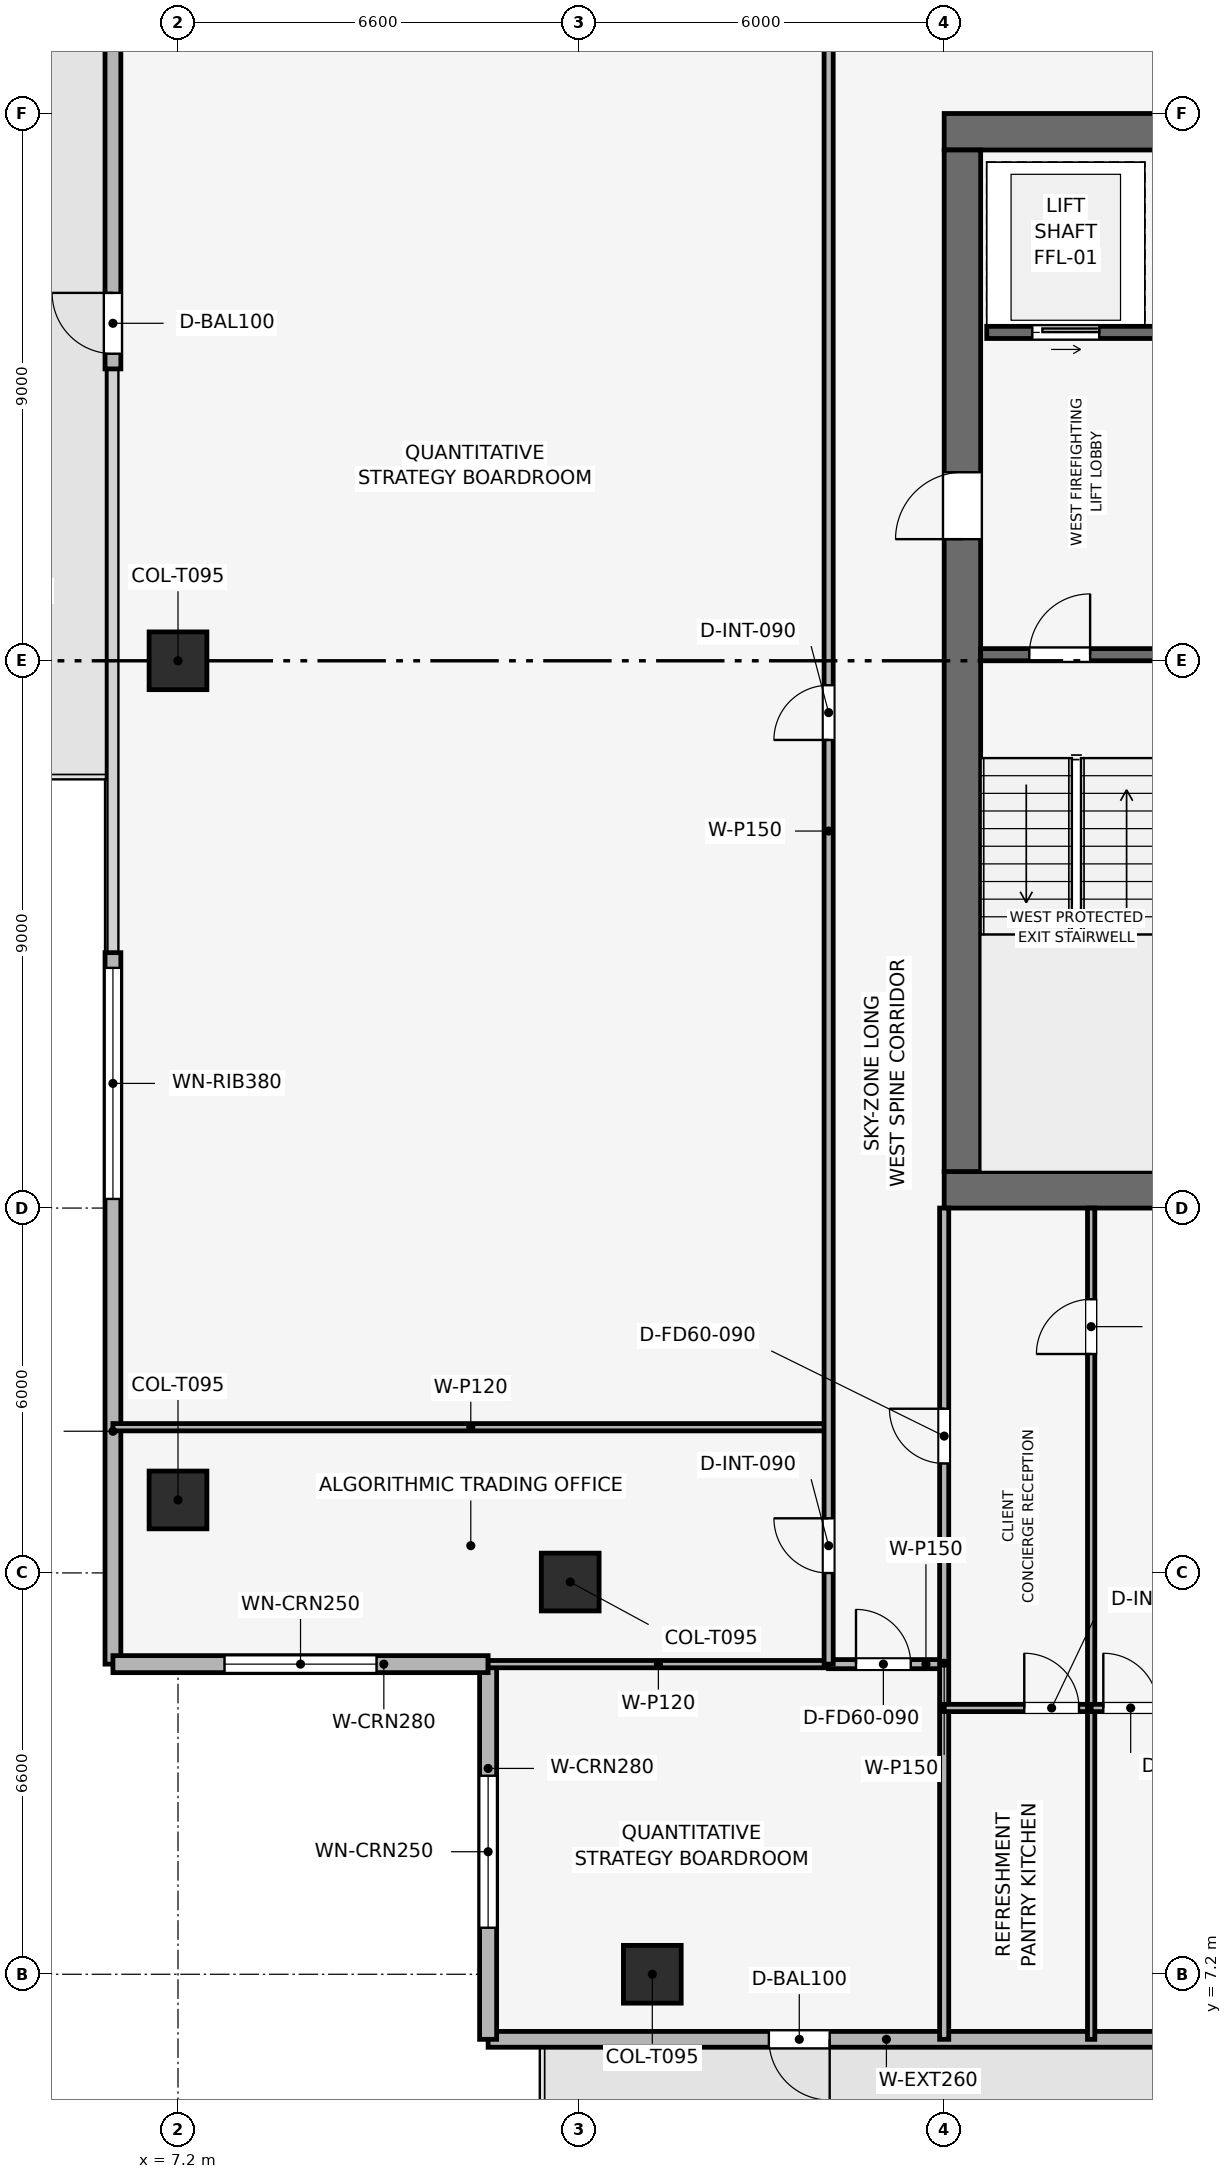
"""IFC4 building model, lengths in metres.
Left out: names, types, materials, properties, quantities, classifications, styles, units other than length and angle.
Written with IfcOpenShell. Run it as: python <this file> out.ifc"""

import sys

from ifc_helpers import new_model, si_unit, direction, frame, frame_2d, origin, origin_2d, place, context, subcontext, project, spatial, rectangle, extrude, element, fill, save


model = new_model("IFC4")
c1 = context("Model", 3, precision=1e-05, world=origin(), true_north=direction((0.0, 1.0)))
c2 = subcontext(c1, "Body", "Model", "MODEL_VIEW")
j1 = project(units=[si_unit("LENGTHUNIT", "METRE"), si_unit("PLANEANGLEUNIT", "RADIAN")], contexts=[c1])
p1 = place(None, origin())
s1 = spatial("IfcSite", under=j1, at=p1, CompositionType="ELEMENT")
p2 = place(p1, origin())
s2 = spatial("IfcBuilding", under=s1, at=p2, CompositionType="ELEMENT")
p3 = place(p2, frame((0.0, 0.0, 325.5)))
s3 = spatial("IfcBuildingStorey", under=s2, at=p3, CompositionType="ELEMENT", Elevation=325.5)
p4 = place(p3, frame((19.8, 20.1, 0.0), z_axis=(0.0, 0.0, 1.0), x_axis=(1.0, 0.0, 0.0)))
e1 = element("IfcWall", 1, at=p4, inside=s3, PredefinedType="SHEAR", context=c2, shape_type="SweptSolid", body=[
    extrude(rectangle(XDim=18.0, YDim=0.6, at=frame_2d((9.0, 0.0))), origin(), (0.0, 0.0, 1.0), 3.75),
])
p5 = place(p3, frame((19.8, 37.5, 0.0), z_axis=(0.0, 0.0, 1.0), x_axis=(1.0, 0.0, 0.0)))
e2 = element("IfcWall", 2, at=p5, inside=s3, PredefinedType="SHEAR", context=c2, shape_type="SweptSolid", body=[
    extrude(rectangle(XDim=18.0, YDim=0.6, at=frame_2d((9.0, 0.0))), origin(), (0.0, 0.0, 1.0), 3.75),
])
p6 = place(p5, frame((7.05, 0.0, 0.0)))
e3 = element("IfcOpeningElement", 3, at=p6, cuts=e2, PredefinedType="OPENING", context=c2, shape_type="SweptSolid", body=[
    extrude(rectangle(XDim=1.1, YDim=2.15, at=frame_2d((0.55, 1.075))), frame((0.0, 0.31, 0.0), z_axis=(0.0, -1.0, 0.0), x_axis=(1.0, 0.0, 0.0)), (0.0, 0.0, 1.0), 0.62),
])
p7 = place(p3, frame((20.1, 20.4, 0.0), z_axis=(0.0, 0.0, 1.0), x_axis=(0.0, 1.0, 0.0)))
e4 = element("IfcWall", 4, at=p7, inside=s3, PredefinedType="SHEAR", context=c2, shape_type="SweptSolid", body=[
    extrude(rectangle(XDim=16.8, YDim=0.6, at=frame_2d((8.4, 0.0))), origin(), (0.0, 0.0, 1.0), 3.75),
])
p8 = place(p7, frame((10.4, 0.0, 0.0)))
e5 = element("IfcOpeningElement", 5, at=p8, cuts=e4, PredefinedType="OPENING", context=c2, shape_type="SweptSolid", body=[
    extrude(rectangle(XDim=1.1, YDim=2.15, at=frame_2d((0.55, 1.075))), frame((0.0, 0.31, 0.0), z_axis=(0.0, -1.0, 0.0), x_axis=(1.0, 0.0, 0.0)), (0.0, 0.0, 1.0), 0.62),
])
for number, where, z_axis, x_axis in (
    (6, (15.0, 7.2, 0.003), (0.0, 0.0, 1.0), (1.0, 0.0, 0.0)),
    (7, (7.2, 28.8, 0.003), (0.0, 0.0, 1.0), (1.0, 0.0, 0.0)),
    (8, (7.2, 15.0, 0.003), (0.0, 0.0, 1.0), (1.0, 0.0, 0.0)),
    (9, (13.65, 13.65, 0.003), (0.0, 0.0, 1.0), (1.0, 0.0, 0.0)),
):
    element("IfcColumn", number, at=place(p3, frame(where, z_axis=z_axis, x_axis=x_axis)), inside=s3, PredefinedType="COLUMN", context=c2, shape_type="SweptSolid", body=[
        extrude(rectangle(XDim=0.95, YDim=0.95, at=origin_2d()), origin(), (0.0, 0.0, 1.0), 3.504),
    ])
p9 = place(p3, frame((24.0, 6.13, 0.0), z_axis=(0.0, 0.0, 1.0), x_axis=(-1.0, 0.0, 0.0)))
e10 = element("IfcWall", 10, at=p9, inside=s3, PredefinedType="SOLIDWALL", context=c2, shape_type="SweptSolid", body=[
    extrude(rectangle(XDim=11.7, YDim=0.26, at=frame_2d((5.85, 0.0))), origin(), (0.0, 0.0, 1.0), 3.51),
])
p10 = place(p9, frame((6.083, 0.0, 0.0)))
e11 = element("IfcOpeningElement", 11, at=p10, cuts=e10, PredefinedType="OPENING", context=c2, shape_type="SweptSolid", body=[
    extrude(rectangle(XDim=1.0, YDim=2.2, at=frame_2d((0.5, 1.1))), frame((0.0, 0.14, 0.0), z_axis=(0.0, -1.0, 0.0), x_axis=(1.0, 0.0, 0.0)), (0.0, 0.0, 1.0), 0.28),
])
p11 = place(p3, frame((6.13, 12.3, 0.0), z_axis=(0.0, 0.0, 1.0), x_axis=(0.0, 1.0, 0.0)))
e12 = element("IfcWall", 12, at=p11, inside=s3, PredefinedType="SOLIDWALL", context=c2, shape_type="SweptSolid", body=[
    extrude(rectangle(XDim=11.7, YDim=0.26, at=frame_2d((5.85, 0.0))), origin(), (0.0, 0.0, 1.0), 3.51),
])
p12 = place(p11, frame((7.65, 0.0, 0.9)))
e13 = element("IfcOpeningElement", 13, at=p12, cuts=e12, PredefinedType="OPENING", context=c2, shape_type="SweptSolid", body=[
    extrude(rectangle(XDim=3.8, YDim=1.9, at=frame_2d((1.9, 0.95))), frame((0.0, 0.14, 0.0), z_axis=(0.0, -1.0, 0.0), x_axis=(1.0, 0.0, 0.0)), (0.0, 0.0, 1.0), 0.28),
])
p13 = place(p3, frame((6.13, 33.6, 0.0), z_axis=(0.0, 0.0, 1.0), x_axis=(0.0, 1.0, 0.0)))
e14 = element("IfcWall", 14, at=p13, inside=s3, PredefinedType="SOLIDWALL", context=c2, shape_type="SweptSolid", body=[
    extrude(rectangle(XDim=11.7, YDim=0.26, at=frame_2d((5.85, 0.0))), origin(), (0.0, 0.0, 1.0), 3.51),
])
p14 = place(p13, frame((0.25, 0.0, 0.0)))
e15 = element("IfcOpeningElement", 15, at=p14, cuts=e14, PredefinedType="OPENING", context=c2, shape_type="SweptSolid", body=[
    extrude(rectangle(XDim=1.0, YDim=2.2, at=frame_2d((0.5, 1.1))), frame((0.0, 0.14, 0.0), z_axis=(0.0, -1.0, 0.0), x_axis=(1.0, 0.0, 0.0)), (0.0, 0.0, 1.0), 0.28),
])
p15 = place(p3, frame((12.3, 6.13, 0.0), z_axis=(0.0, 0.0, 1.0), x_axis=(0.0, 1.0, 0.0)))
e16 = element("IfcWall", 16, at=p15, inside=s3, PredefinedType="SOLIDWALL", context=c2, shape_type="SweptSolid", body=[
    extrude(rectangle(XDim=6.17, YDim=0.28, at=frame_2d((3.085, 0.0))), origin(), (0.0, 0.0, 1.0), 3.51),
])
p16 = place(p15, frame((1.835, 0.0, 0.9)))
e17 = element("IfcOpeningElement", 17, at=p16, cuts=e16, PredefinedType="OPENING", context=c2, shape_type="SweptSolid", body=[
    extrude(rectangle(XDim=2.5, YDim=1.9, at=frame_2d((1.25, 0.95))), frame((0.0, 0.15, 0.0), z_axis=(0.0, -1.0, 0.0), x_axis=(1.0, 0.0, 0.0)), (0.0, 0.0, 1.0), 0.3),
])
p17 = place(p3, frame((12.3, 12.3, 0.0), z_axis=(0.0, 0.0, 1.0), x_axis=(-1.0, 0.0, 0.0)))
e18 = element("IfcWall", 18, at=p17, inside=s3, PredefinedType="SOLIDWALL", context=c2, shape_type="SweptSolid", body=[
    extrude(rectangle(XDim=6.17, YDim=0.28, at=frame_2d((3.085, 0.0))), origin(), (0.0, 0.0, 1.0), 3.51),
])
p18 = place(p17, frame((1.835, 0.0, 0.9)))
e19 = element("IfcOpeningElement", 19, at=p18, cuts=e18, PredefinedType="OPENING", context=c2, shape_type="SweptSolid", body=[
    extrude(rectangle(XDim=2.5, YDim=1.9, at=frame_2d((1.25, 0.95))), frame((0.0, 0.15, 0.0), z_axis=(0.0, -1.0, 0.0), x_axis=(1.0, 0.0, 0.0)), (0.0, 0.0, 1.0), 0.3),
])
p19 = place(p3, frame((20.4, 28.9, 0.0), z_axis=(0.0, 0.0, 1.0), x_axis=(1.0, 0.0, 0.0)))
e20 = element("IfcWall", 20, at=p19, inside=s3, PredefinedType="SHEAR", context=c2, shape_type="SweptSolid", body=[
    extrude(rectangle(XDim=3.15, YDim=0.2, at=frame_2d((1.575, 0.0))), origin(), (0.0, 0.0, 1.0), 3.51),
])
p20 = place(p19, frame((0.8, 0.0, 0.0)))
e21 = element("IfcOpeningElement", 21, at=p20, cuts=e20, PredefinedType="OPENING", context=c2, shape_type="SweptSolid", body=[
    extrude(rectangle(XDim=1.0, YDim=2.1, at=frame_2d((0.5, 1.05))), frame((0.0, 0.11, 0.0), z_axis=(0.0, -1.0, 0.0), x_axis=(1.0, 0.0, 0.0)), (0.0, 0.0, 1.0), 0.22),
])
p21 = place(p3, frame((20.5, 34.2, 0.0), z_axis=(0.0, 0.0, 1.0), x_axis=(1.0, 0.0, 0.0)))
e22 = element("IfcWall", 22, at=p21, inside=s3, PredefinedType="SHEAR", context=c2, shape_type="SweptSolid", body=[
    extrude(rectangle(XDim=3.05, YDim=0.2, at=frame_2d((1.525, 0.0))), origin(), (0.0, 0.0, 1.0), 3.51),
])
p22 = place(p21, frame((0.75, 0.0, 0.0)))
e23 = element("IfcOpeningElement", 23, at=p22, cuts=e22, PredefinedType="OPENING", context=c2, shape_type="SweptSolid", body=[
    extrude(rectangle(XDim=1.1, YDim=2.15, at=frame_2d((0.55, 1.075))), frame((0.0, 0.11, 0.0), z_axis=(0.0, -1.0, 0.0), x_axis=(1.0, 0.0, 0.0)), (0.0, 0.0, 1.0), 0.22),
])
p23 = place(p3, frame((6.13, 16.196, 0.0), z_axis=(0.0, 0.0, 1.0), x_axis=(1.0, 0.0, 0.0)))
e24 = element("IfcWall", 24, at=p23, inside=s3, PredefinedType="PARTITIONING", context=c2, shape_type="SweptSolid", body=[
    extrude(rectangle(XDim=11.77, YDim=0.12, at=frame_2d((5.885, 0.0))), origin(), (0.0, 0.0, 1.0), 3.095),
])
p24 = place(p3, frame((12.3, 12.3, 0.0), z_axis=(0.0, 0.0, 1.0), x_axis=(1.0, 0.0, 0.0)))
e25 = element("IfcWall", 25, at=p24, inside=s3, PredefinedType="PARTITIONING", context=c2, shape_type="SweptSolid", body=[
    extrude(rectangle(XDim=5.6, YDim=0.12, at=frame_2d((2.8, 0.0))), origin(), (0.0, 0.0, 1.0), 3.195),
])
p25 = place(p3, frame((17.9, 12.3, 0.0), z_axis=(0.0, 0.0, 1.0), x_axis=(1.0, 0.0, 0.0)))
e26 = element("IfcWall", 26, at=p25, inside=s3, PredefinedType="PARTITIONING", context=c2, shape_type="SweptSolid", body=[
    extrude(rectangle(XDim=1.9, YDim=0.15, at=frame_2d((0.95, 0.0))), origin(), (0.0, 0.0, 1.0), 3.51),
])
p26 = place(p25, frame((0.45, 0.0, 0.0)))
e27 = element("IfcOpeningElement", 27, at=p26, cuts=e26, PredefinedType="OPENING", context=c2, shape_type="SweptSolid", body=[
    extrude(rectangle(XDim=0.9, YDim=2.1, at=frame_2d((0.45, 1.05))), frame((0.0, 0.085, 0.0), z_axis=(0.0, -1.0, 0.0), x_axis=(1.0, 0.0, 0.0)), (0.0, 0.0, 1.0), 0.17),
])
p27 = place(p3, frame((19.8, 6.13, 0.0), z_axis=(0.0, 0.0, 1.0), x_axis=(0.0, 1.0, 0.0)))
e28 = element("IfcWall", 28, at=p27, inside=s3, PredefinedType="PARTITIONING", context=c2, shape_type="SweptSolid", body=[
    extrude(rectangle(XDim=13.67, YDim=0.15, at=frame_2d((6.835, 0.0))), origin(), (0.0, 0.0, 1.0), 3.095),
])
p28 = place(p27, frame((9.47, 0.0, 0.0)))
e29 = element("IfcOpeningElement", 29, at=p28, cuts=e28, PredefinedType="OPENING", context=c2, shape_type="SweptSolid", body=[
    extrude(rectangle(XDim=0.9, YDim=2.1, at=frame_2d((0.45, 1.05))), frame((0.0, 0.085, 0.0), z_axis=(0.0, -1.0, 0.0), x_axis=(1.0, 0.0, 0.0)), (0.0, 0.0, 1.0), 0.17),
])
p29 = place(p3, frame((19.8, 11.579, 0.0), z_axis=(0.0, 0.0, 1.0), x_axis=(1.0, 0.0, 0.0)))
e30 = element("IfcWall", 30, at=p29, inside=s3, PredefinedType="PARTITIONING", context=c2, shape_type="SweptSolid", body=[
    extrude(rectangle(XDim=2.417, YDim=0.12, at=frame_2d((1.208, 0.0))), origin(), (0.0, 0.0, 1.0), 3.095),
])
p30 = place(p29, frame((1.317, 0.0, 0.0)))
e31 = element("IfcOpeningElement", 31, at=p30, cuts=e30, PredefinedType="OPENING", context=c2, shape_type="SweptSolid", body=[
    extrude(rectangle(XDim=0.9, YDim=2.1, at=frame_2d((0.45, 1.05))), frame((0.0, 0.07, 0.0), z_axis=(0.0, -1.0, 0.0), x_axis=(1.0, 0.0, 0.0)), (0.0, 0.0, 1.0), 0.14),
])
p31 = place(p3, frame((22.217, 6.13, 0.0), z_axis=(0.0, 0.0, 1.0), x_axis=(0.0, 1.0, 0.0)))
e32 = element("IfcWall", 32, at=p31, inside=s3, PredefinedType="PARTITIONING", context=c2, shape_type="SweptSolid", body=[
    extrude(rectangle(XDim=13.67, YDim=0.12, at=frame_2d((6.835, 0.0))), origin(), (0.0, 0.0, 1.0), 3.135),
])
p32 = place(p31, frame((11.27, 0.0, 0.0)))
e33 = element("IfcOpeningElement", 33, at=p32, cuts=e32, PredefinedType="OPENING", context=c2, shape_type="SweptSolid", body=[
    extrude(rectangle(XDim=0.9, YDim=2.1, at=frame_2d((0.45, 1.05))), frame((0.0, 0.07, 0.0), z_axis=(0.0, -1.0, 0.0), x_axis=(1.0, 0.0, 0.0)), (0.0, 0.0, 1.0), 0.14),
])
p33 = place(p3, frame((22.217, 11.579, 0.0), z_axis=(0.0, 0.0, 1.0), x_axis=(1.0, 0.0, 0.0)))
e34 = element("IfcWall", 34, at=p33, inside=s3, PredefinedType="PARTITIONING", context=c2, shape_type="SweptSolid", body=[
    extrude(rectangle(XDim=10.281, YDim=0.12, at=frame_2d((5.141, 0.0))), origin(), (0.0, 0.0, 1.0), 3.095),
])
p34 = place(p33, frame((0.2, 0.0, 0.0)))
e35 = element("IfcOpeningElement", 35, at=p34, cuts=e34, PredefinedType="OPENING", context=c2, shape_type="SweptSolid", body=[
    extrude(rectangle(XDim=0.9, YDim=2.1, at=frame_2d((0.45, 1.05))), frame((0.0, 0.07, 0.0), z_axis=(0.0, -1.0, 0.0), x_axis=(1.0, 0.0, 0.0)), (0.0, 0.0, 1.0), 0.14),
])
p35 = place(p3, frame((17.9, 12.3, 0.0), z_axis=(0.0, 0.0, 1.0), x_axis=(0.0, 1.0, 0.0)))
e36 = element("IfcWall", 36, at=p35, inside=s3, PredefinedType="PARTITIONING", context=c2, shape_type="SweptSolid", body=[
    extrude(rectangle(XDim=27.4, YDim=0.15, at=frame_2d((13.7, 0.0))), origin(), (0.0, 0.0, 1.0), 3.095),
])
p36 = place(p35, frame((1.498, 0.0, 0.0)))
e37 = element("IfcOpeningElement", 37, at=p36, cuts=e36, PredefinedType="OPENING", context=c2, shape_type="SweptSolid", body=[
    extrude(rectangle(XDim=0.9, YDim=2.1, at=frame_2d((0.45, 1.05))), frame((0.0, 0.085, 0.0), z_axis=(0.0, -1.0, 0.0), x_axis=(1.0, 0.0, 0.0)), (0.0, 0.0, 1.0), 0.17),
])
p37 = place(p35, frame((15.198, 0.0, 0.0)))
e38 = element("IfcOpeningElement", 38, at=p37, cuts=e36, PredefinedType="OPENING", context=c2, shape_type="SweptSolid", body=[
    extrude(rectangle(XDim=0.9, YDim=2.1, at=frame_2d((0.45, 1.05))), frame((0.0, 0.085, 0.0), z_axis=(0.0, -1.0, 0.0), x_axis=(1.0, 0.0, 0.0)), (0.0, 0.0, 1.0), 0.17),
])
p38 = place(p10, origin())
e39 = element("IfcDoor", 39, at=p38, inside=s3, OperationType="SINGLE_SWING_LEFT", PredefinedType="DOOR", context=c2, shape_type="SweptSolid", body=[
    extrude(rectangle(XDim=1.0, YDim=2.2, at=frame_2d((0.5, 1.1))), frame((0.0, 0.025, 0.0), z_axis=(0.0, -1.0, 0.0), x_axis=(1.0, 0.0, 0.0)), (0.0, 0.0, 1.0), 0.05),
])
fill(e11, e39)
p39 = place(p14, origin())
e40 = element("IfcDoor", 40, at=p39, inside=s3, OperationType="SINGLE_SWING_RIGHT", PredefinedType="DOOR", context=c2, shape_type="SweptSolid", body=[
    extrude(rectangle(XDim=1.0, YDim=2.2, at=frame_2d((0.5, 1.1))), frame((0.0, 0.025, 0.0), z_axis=(0.0, -1.0, 0.0), x_axis=(1.0, 0.0, 0.0)), (0.0, 0.0, 1.0), 0.05),
])
fill(e15, e40)
p40 = place(p12, origin())
e41 = element("IfcWindow", 41, at=p40, inside=s3, PartitioningType="SINGLE_PANEL", PredefinedType="WINDOW", context=c2, shape_type="SweptSolid", body=[
    extrude(rectangle(XDim=3.8, YDim=1.9, at=frame_2d((1.9, 0.95))), frame((0.0, 0.03, 0.0), z_axis=(0.0, -1.0, 0.0), x_axis=(1.0, 0.0, 0.0)), (0.0, 0.0, 1.0), 0.06),
])
fill(e13, e41)
p41 = place(p16, origin())
e42 = element("IfcWindow", 42, at=p41, inside=s3, PartitioningType="SINGLE_PANEL", PredefinedType="WINDOW", context=c2, shape_type="SweptSolid", body=[
    extrude(rectangle(XDim=2.5, YDim=1.9, at=frame_2d((1.25, 0.95))), frame((0.0, 0.03, 0.0), z_axis=(0.0, -1.0, 0.0), x_axis=(1.0, 0.0, 0.0)), (0.0, 0.0, 1.0), 0.06),
])
fill(e17, e42)
p42 = place(p18, origin())
e43 = element("IfcWindow", 43, at=p42, inside=s3, PartitioningType="SINGLE_PANEL", PredefinedType="WINDOW", context=c2, shape_type="SweptSolid", body=[
    extrude(rectangle(XDim=2.5, YDim=1.9, at=frame_2d((1.25, 0.95))), frame((0.0, 0.03, 0.0), z_axis=(0.0, -1.0, 0.0), x_axis=(1.0, 0.0, 0.0)), (0.0, 0.0, 1.0), 0.06),
])
fill(e19, e43)
p43 = place(p20, origin())
e44 = element("IfcDoor", 44, at=p43, inside=s3, OperationType="SINGLE_SWING_RIGHT", PredefinedType="DOOR", context=c2, shape_type="SweptSolid", body=[
    extrude(rectangle(XDim=1.0, YDim=2.1, at=frame_2d((0.5, 1.05))), frame((0.0, 0.025, 0.0), z_axis=(0.0, -1.0, 0.0), x_axis=(1.0, 0.0, 0.0)), (0.0, 0.0, 1.0), 0.05),
])
fill(e21, e44)
p44 = place(p22, origin())
e45 = element("IfcDoor", 45, at=p44, inside=s3, OperationType="SLIDING_TO_RIGHT", PredefinedType="DOOR", context=c2, shape_type="SweptSolid", body=[
    extrude(rectangle(XDim=1.1, YDim=2.15, at=frame_2d((0.55, 1.075))), frame((0.0, 0.025, 0.0), z_axis=(0.0, -1.0, 0.0), x_axis=(1.0, 0.0, 0.0)), (0.0, 0.0, 1.0), 0.05),
])
fill(e23, e45)
p45 = place(p26, origin())
e46 = element("IfcDoor", 46, at=p45, inside=s3, OperationType="SINGLE_SWING_LEFT", PredefinedType="DOOR", context=c2, shape_type="SweptSolid", body=[
    extrude(rectangle(XDim=0.9, YDim=2.1, at=frame_2d((0.45, 1.05))), frame((0.0, 0.025, 0.0), z_axis=(0.0, -1.0, 0.0), x_axis=(1.0, 0.0, 0.0)), (0.0, 0.0, 1.0), 0.05),
])
fill(e27, e46)
p46 = place(p28, origin())
e47 = element("IfcDoor", 47, at=p46, inside=s3, OperationType="SINGLE_SWING_RIGHT", PredefinedType="DOOR", context=c2, shape_type="SweptSolid", body=[
    extrude(rectangle(XDim=0.9, YDim=2.1, at=frame_2d((0.45, 1.05))), frame((0.0, 0.025, 0.0), z_axis=(0.0, -1.0, 0.0), x_axis=(1.0, 0.0, 0.0)), (0.0, 0.0, 1.0), 0.05),
])
fill(e29, e47)
p47 = place(p30, origin())
e48 = element("IfcDoor", 48, at=p47, inside=s3, OperationType="SINGLE_SWING_LEFT", PredefinedType="DOOR", context=c2, shape_type="SweptSolid", body=[
    extrude(rectangle(XDim=0.9, YDim=2.1, at=frame_2d((0.45, 1.05))), frame((0.0, 0.025, 0.0), z_axis=(0.0, -1.0, 0.0), x_axis=(1.0, 0.0, 0.0)), (0.0, 0.0, 1.0), 0.05),
])
fill(e31, e48)
p48 = place(p32, origin())
e49 = element("IfcDoor", 49, at=p48, inside=s3, OperationType="SINGLE_SWING_LEFT", PredefinedType="DOOR", context=c2, shape_type="SweptSolid", body=[
    extrude(rectangle(XDim=0.9, YDim=2.1, at=frame_2d((0.45, 1.05))), frame((0.0, 0.025, 0.0), z_axis=(0.0, -1.0, 0.0), x_axis=(1.0, 0.0, 0.0)), (0.0, 0.0, 1.0), 0.05),
])
fill(e33, e49)
p49 = place(p34, origin())
e50 = element("IfcDoor", 50, at=p49, inside=s3, OperationType="SINGLE_SWING_LEFT", PredefinedType="DOOR", context=c2, shape_type="SweptSolid", body=[
    extrude(rectangle(XDim=0.9, YDim=2.1, at=frame_2d((0.45, 1.05))), frame((0.0, 0.025, 0.0), z_axis=(0.0, -1.0, 0.0), x_axis=(1.0, 0.0, 0.0)), (0.0, 0.0, 1.0), 0.05),
])
fill(e35, e50)
p50 = place(p36, origin())
e51 = element("IfcDoor", 51, at=p50, inside=s3, OperationType="SINGLE_SWING_RIGHT", PredefinedType="DOOR", context=c2, shape_type="SweptSolid", body=[
    extrude(rectangle(XDim=0.9, YDim=2.1, at=frame_2d((0.45, 1.05))), frame((0.0, 0.025, 0.0), z_axis=(0.0, -1.0, 0.0), x_axis=(1.0, 0.0, 0.0)), (0.0, 0.0, 1.0), 0.05),
])
fill(e37, e51)
p51 = place(p37, origin())
e52 = element("IfcDoor", 52, at=p51, inside=s3, OperationType="SINGLE_SWING_LEFT", PredefinedType="DOOR", context=c2, shape_type="SweptSolid", body=[
    extrude(rectangle(XDim=0.9, YDim=2.1, at=frame_2d((0.45, 1.05))), frame((0.0, 0.025, 0.0), z_axis=(0.0, -1.0, 0.0), x_axis=(1.0, 0.0, 0.0)), (0.0, 0.0, 1.0), 0.05),
])
fill(e38, e52)
p52 = place(p8, origin())
e53 = element("IfcDoor", 53, at=p52, inside=s3, OperationType="SINGLE_SWING_LEFT", PredefinedType="DOOR", context=c2, shape_type="SweptSolid", body=[
    extrude(rectangle(XDim=1.1, YDim=2.15, at=frame_2d((0.55, 1.075))), frame((0.0, 0.025, 0.0), z_axis=(0.0, -1.0, 0.0), x_axis=(1.0, 0.0, 0.0)), (0.0, 0.0, 1.0), 0.05),
])
fill(e5, e53)
save(model, sys.argv[1])
